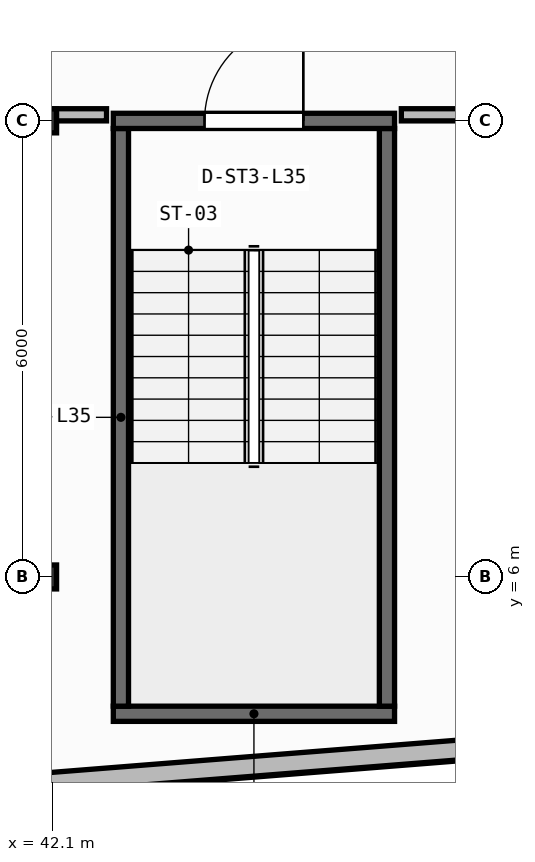
"""IFC4 building model, lengths in metres.
Left out: names, types, materials, properties, quantities, classifications, styles, units other than length and angle.
Written with IfcOpenShell. Run it as: python <this file> out.ifc"""

import sys

from ifc_helpers import new_model, si_unit, direction, frame, frame_2d, origin, origin_2d, place, context, subcontext, project, spatial, rectangle, i_section, extrude, element, fill, save


model = new_model("IFC4")
c1 = context("Model", 3, precision=1e-05, world=origin(), true_north=direction((0.0, 1.0)))
c2 = subcontext(c1, "Body", "Model", "MODEL_VIEW")
j1 = project(units=[si_unit("LENGTHUNIT", "METRE"), si_unit("PLANEANGLEUNIT", "RADIAN")], contexts=[c1])
p1 = place(None, origin())
s1 = spatial("IfcSite", under=j1, at=p1, CompositionType="ELEMENT")
p2 = place(p1, origin())
s2 = spatial("IfcBuilding", under=s1, at=p2, CompositionType="ELEMENT")
p3 = place(p2, frame((0.0, 0.0, 142.85)))
s3 = spatial("IfcBuildingStorey", under=s2, at=p3, CompositionType="ELEMENT", Elevation=142.85)
for number, where, z_axis, x_axis in (
    (1, (42.0, 6.0, 0.0), (0.0, 0.0, 1.0), (1.0, 0.0, 0.0)),
    (2, (42.0, 12.0, 0.0), (0.0, 0.0, 1.0), (1.0, 0.0, 0.0)),
):
    element("IfcColumn", number, at=place(p3, frame(where, z_axis=z_axis, x_axis=x_axis)), inside=s3, PredefinedType="COLUMN", context=c2, shape_type="SweptSolid", body=[
        extrude(i_section(OverallWidth=0.307, OverallDepth=0.315, WebThickness=0.012, FlangeThickness=0.019, FilletRadius=0.017, at=origin_2d()), origin(), (0.0, 0.0, 1.0), 3.95),
    ])
p4 = place(p3, frame((2.76, 0.173, 0.0), z_axis=(0.0, 0.0, 1.0), x_axis=(0.996857931723, 0.079210251617, 0.0)))
e3 = element("IfcWall", 3, at=p4, inside=s3, PredefinedType="STANDARD", context=c2, shape_type="SweptSolid", body=[
    extrude(rectangle(XDim=51.442, YDim=0.26, at=frame_2d((25.721, 0.0))), origin(), (0.0, 0.0, 1.0), 3.71),
])
p5 = place(p4, frame((24.521, 0.0, 0.9)))
e4 = element("IfcOpeningElement", 4, at=p5, cuts=e3, PredefinedType="OPENING", context=c2, shape_type="SweptSolid", body=[
    extrude(rectangle(XDim=2.4, YDim=1.65, at=frame_2d((1.2, 0.825))), frame((0.0, 0.14, 0.0), z_axis=(0.0, -1.0, 0.0), x_axis=(1.0, 0.0, 0.0)), (0.0, 0.0, 1.0), 0.28),
])
p6 = place(p3, frame((42.9, 4.2, 0.0), z_axis=(0.0, 0.0, 1.0), x_axis=(1.0, 0.0, 0.0)))
e5 = element("IfcWall", 5, at=p6, inside=s3, PredefinedType="SHEAR", context=c2, shape_type="SweptSolid", body=[
    extrude(rectangle(XDim=3.7, YDim=0.2, at=frame_2d((1.85, 0.0))), origin(), (0.0, 0.0, 1.0), 3.71),
])
for number, where, z_axis, x_axis in (
    (6, (43.0, 4.3, 0.0), (0.0, 0.0, 1.0), (0.0, 1.0, 0.0)),
    (7, (46.5, 4.3, 0.0), (0.0, 0.0, 1.0), (0.0, 1.0, 0.0)),
):
    element("IfcWall", number, at=place(p3, frame(where, z_axis=z_axis, x_axis=x_axis)), inside=s3, PredefinedType="SHEAR", context=c2, shape_type="SweptSolid", body=[
        extrude(rectangle(XDim=7.6, YDim=0.2, at=frame_2d((3.8, 0.0))), origin(), (0.0, 0.0, 1.0), 3.71),
    ])
p7 = place(p3, frame((42.9, 12.0, 0.0), z_axis=(0.0, 0.0, 1.0), x_axis=(1.0, 0.0, 0.0)))
e8 = element("IfcWall", 8, at=p7, inside=s3, PredefinedType="SHEAR", context=c2, shape_type="SweptSolid", body=[
    extrude(rectangle(XDim=3.7, YDim=0.2, at=frame_2d((1.85, 0.0))), origin(), (0.0, 0.0, 1.0), 3.71),
])
p8 = place(p7, frame((1.2, 0.0, 0.0)))
e9 = element("IfcOpeningElement", 9, at=p8, cuts=e8, PredefinedType="OPENING", context=c2, shape_type="SweptSolid", body=[
    extrude(rectangle(XDim=1.3, YDim=2.15, at=frame_2d((0.65, 1.075))), frame((0.0, 0.11, 0.0), z_axis=(0.0, -1.0, 0.0), x_axis=(1.0, 0.0, 0.0)), (0.0, 0.0, 1.0), 0.22),
])
p9 = place(p3, frame((40.03, 12.08, 0.0), z_axis=(0.0, 0.0, 1.0), x_axis=(1.0, 0.0, 0.0)))
e10 = element("IfcWall", 10, at=p9, inside=s3, PredefinedType="PARTITIONING", context=c2, shape_type="SweptSolid", body=[
    extrude(rectangle(XDim=2.781, YDim=0.16, at=frame_2d((1.39, 0.0))), origin(), (0.0, 0.0, 1.0), 3.083),
])
p10 = place(p3, frame((46.689, 12.08, 0.0), z_axis=(0.0, 0.0, 1.0), x_axis=(1.0, 0.0, 0.0)))
e11 = element("IfcWall", 11, at=p10, inside=s3, PredefinedType="PARTITIONING", context=c2, shape_type="SweptSolid", body=[
    extrude(rectangle(XDim=3.011, YDim=0.16, at=frame_2d((1.505, 0.0))), origin(), (0.0, 0.0, 1.0), 3.083),
])
p11 = place(p8, origin())
e12 = element("IfcDoor", 12, at=p11, inside=s3, OperationType="SINGLE_SWING_RIGHT", PredefinedType="DOOR", context=c2, shape_type="SweptSolid", body=[
    extrude(rectangle(XDim=1.3, YDim=2.15, at=frame_2d((0.65, 1.075))), frame((0.0, 0.025, 0.0), z_axis=(0.0, -1.0, 0.0), x_axis=(1.0, 0.0, 0.0)), (0.0, 0.0, 1.0), 0.05),
])
fill(e9, e12)
save(model, sys.argv[1])
